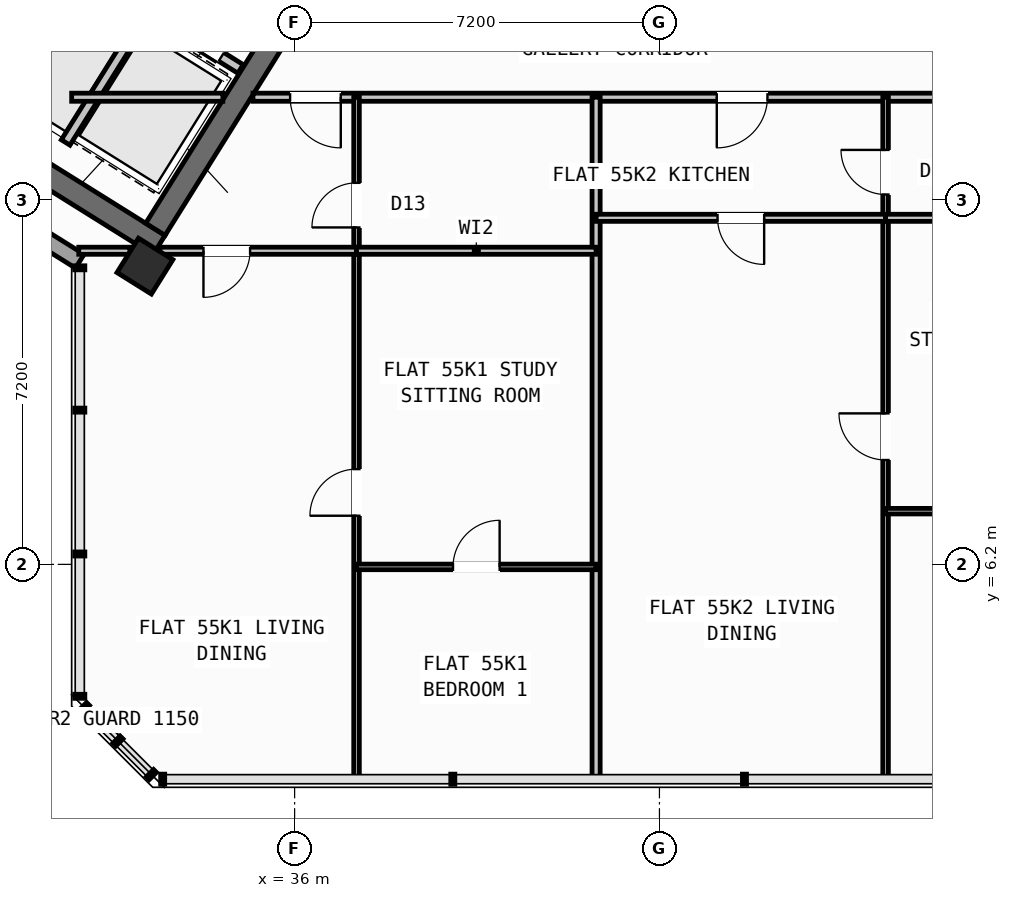
"""IFC4 building model, lengths in metres.
Left out: names, types, materials, properties, quantities, classifications, styles, units other than length and angle.
Written with IfcOpenShell. Run it as: python <this file> out.ifc"""

import sys

from ifc_helpers import new_model, si_unit, direction, frame, frame_2d, origin, origin_2d, place, context, subcontext, project, spatial, rectangle, hollow_rectangle, extrude, source, transform, mapped, element, fill, save


model = new_model("IFC4")
c1 = context("Model", 3, precision=1e-05, world=origin(), true_north=direction((0.0, 1.0)))
c2 = subcontext(c1, "Body", "Model", "MODEL_VIEW")
j1 = project(units=[si_unit("LENGTHUNIT", "METRE"), si_unit("PLANEANGLEUNIT", "RADIAN")], contexts=[c1])
p1 = place(None, origin())
s1 = spatial("IfcSite", under=j1, at=p1, CompositionType="ELEMENT")
p2 = place(p1, origin())
s2 = spatial("IfcBuilding", under=s1, at=p2, CompositionType="ELEMENT")
p3 = place(p2, frame((0.0, 0.0, 218.4)))
s3 = spatial("IfcBuildingStorey", under=s2, at=p3, CompositionType="ELEMENT", Elevation=218.4)
p4 = place(p3, frame((33.324, 12.503, 0.0), z_axis=(0.0, 0.0, 1.0), x_axis=(-0.848043529849, 0.529926571782, 0.0)))
e1 = element("IfcWall", 1, at=p4, inside=s3, PredefinedType="SHEAR", context=c2, shape_type="SweptSolid", body=[
    extrude(rectangle(XDim=13.04, YDim=0.45, at=frame_2d((6.52, 0.0))), origin(), (0.0, 0.0, 1.0), 3.35),
])
p5 = place(p3, frame((36.683, 18.304, 0.0), z_axis=(0.0, 0.0, 1.0), x_axis=(-0.529904039071, -0.848057609704, 0.0)))
e2 = element("IfcWall", 2, at=p5, inside=s3, PredefinedType="SHEAR", context=c2, shape_type="SweptSolid", body=[
    extrude(rectangle(XDim=6.475, YDim=0.45, at=frame_2d((3.238, 0.0))), origin(), (0.0, 0.0, 1.0), 3.35),
])
m1 = source(origin(), c2, "Body", "SweptSolid", [
    extrude(hollow_rectangle(XDim=0.8, YDim=0.8, WallThickness=0.032, at=origin_2d()), origin(), (0.0, 0.0, 1.0), 3.6),
])
p6 = place(p3, frame((33.046, 12.087, 0.0), z_axis=(0.0, 0.0, 1.0), x_axis=(-0.848048096156, 0.529919264233, 0.0)))
e3 = element("IfcColumn", 3, at=p6, inside=s3, PredefinedType="COLUMN", context=c2, shape_type="MappedRepresentation", body=[
    mapped(m1, transform((0.0, 0.0, 0.0), scale=1.0)),
])
p7 = place(p3, frame((31.76, 12.183, 0.0), z_axis=(0.0, 0.0, 1.0), x_axis=(-0.848047074256, 0.529920899612, 0.0)))
e4 = element("IfcWall", 4, at=p7, inside=s3, PredefinedType="STANDARD", context=c2, shape_type="SweptSolid", body=[
    extrude(rectangle(XDim=30.652, YDim=0.32, at=frame_2d((15.326, 0.0))), origin(), (0.0, 0.0, 1.0), 3.35),
])
p8 = place(p7, frame((15.166, 0.0, 0.0)))
e5 = element("IfcOpeningElement", 5, at=p8, cuts=e4, PredefinedType="OPENING", context=c2, shape_type="SweptSolid", body=[
    extrude(rectangle(XDim=1.2, YDim=2.15, at=frame_2d((0.6, 1.075))), frame((0.0, 0.17, 0.0), z_axis=(0.0, -1.0, 0.0), x_axis=(1.0, 0.0, 0.0)), (0.0, 0.0, 1.0), 0.34),
])
p9 = place(p7, frame((2.24, 0.0, 0.9)))
e6 = element("IfcOpeningElement", 6, at=p9, cuts=e4, PredefinedType="OPENING", context=c2, shape_type="SweptSolid", body=[
    extrude(rectangle(XDim=1.65, YDim=1.45, at=frame_2d((0.825, 0.725))), frame((0.0, 0.17, 0.0), z_axis=(0.0, -1.0, 0.0), x_axis=(1.0, 0.0, 0.0)), (0.0, 0.0, 1.0), 0.34),
])
p10 = place(p7, frame((7.469, 0.0, 0.9)))
e7 = element("IfcOpeningElement", 7, at=p10, cuts=e4, PredefinedType="OPENING", context=c2, shape_type="SweptSolid", body=[
    extrude(rectangle(XDim=1.65, YDim=1.45, at=frame_2d((0.825, 0.725))), frame((0.0, 0.17, 0.0), z_axis=(0.0, -1.0, 0.0), x_axis=(1.0, 0.0, 0.0)), (0.0, 0.0, 1.0), 0.34),
])
p11 = place(p7, frame((12.623, 0.0, 1.0)))
e8 = element("IfcOpeningElement", 8, at=p11, cuts=e4, PredefinedType="OPENING", context=c2, shape_type="SweptSolid", body=[
    extrude(rectangle(XDim=0.9, YDim=1.25, at=frame_2d((0.45, 0.625))), frame((0.0, 0.17, 0.0), z_axis=(0.0, -1.0, 0.0), x_axis=(1.0, 0.0, 0.0)), (0.0, 0.0, 1.0), 0.34),
])
p12 = place(p7, frame((19.583, 0.0, 1.0)))
e9 = element("IfcOpeningElement", 9, at=p12, cuts=e4, PredefinedType="OPENING", context=c2, shape_type="SweptSolid", body=[
    extrude(rectangle(XDim=0.9, YDim=1.25, at=frame_2d((0.45, 0.625))), frame((0.0, 0.17, 0.0), z_axis=(0.0, -1.0, 0.0), x_axis=(1.0, 0.0, 0.0)), (0.0, 0.0, 1.0), 0.34),
])
p13 = place(p7, frame((22.033, 0.0, 1.0)))
e10 = element("IfcOpeningElement", 10, at=p13, cuts=e4, PredefinedType="OPENING", context=c2, shape_type="SweptSolid", body=[
    extrude(rectangle(XDim=0.9, YDim=1.25, at=frame_2d((0.45, 0.625))), frame((0.0, 0.17, 0.0), z_axis=(0.0, -1.0, 0.0), x_axis=(1.0, 0.0, 0.0)), (0.0, 0.0, 1.0), 0.34),
])
p14 = place(p7, frame((27.666, 0.0, 0.9)))
e11 = element("IfcOpeningElement", 11, at=p14, cuts=e4, PredefinedType="OPENING", context=c2, shape_type="SweptSolid", body=[
    extrude(rectangle(XDim=1.35, YDim=1.45, at=frame_2d((0.675, 0.725))), frame((0.0, 0.17, 0.0), z_axis=(0.0, -1.0, 0.0), x_axis=(1.0, 0.0, 0.0)), (0.0, 0.0, 1.0), 0.34),
])
p15 = place(p3, frame((31.288, 18.256, 0.0), z_axis=(0.0, 0.0, 1.0), x_axis=(-0.529943379326, -0.848033026897, 0.0)))
e12 = element("IfcWall", 12, at=p15, inside=s3, PredefinedType="SHEAR", context=c2, shape_type="SweptSolid", body=[
    extrude(rectangle(XDim=3.16, YDim=0.26, at=frame_2d((1.58, 0.0))), origin(), (0.0, 0.0, 1.0), 3.35),
])
p16 = place(p3, frame((34.933, 15.978, 0.0), z_axis=(0.0, 0.0, 1.0), x_axis=(-0.848055739377, 0.529907032327, 0.0)))
e13 = element("IfcWall", 13, at=p16, inside=s3, PredefinedType="STANDARD", context=c2, shape_type="SweptSolid", body=[
    extrude(rectangle(XDim=4.298, YDim=0.2, at=frame_2d((2.149, 0.0))), origin(), (0.0, 0.0, 1.0), 3.34),
])
p17 = place(p16, frame((0.448, 0.0, 0.0)))
e14 = element("IfcOpeningElement", 14, at=p17, cuts=e13, PredefinedType="OPENING", context=c2, shape_type="SweptSolid", body=[
    extrude(rectangle(XDim=1.3, YDim=2.2, at=frame_2d((0.65, 1.1))), frame((0.0, 0.11, 0.0), z_axis=(0.0, -1.0, 0.0), x_axis=(1.0, 0.0, 0.0)), (0.0, 0.0, 1.0), 0.22),
])
p18 = place(p16, frame((2.523, 0.0, 0.0)))
e15 = element("IfcOpeningElement", 15, at=p18, cuts=e13, PredefinedType="OPENING", context=c2, shape_type="SweptSolid", body=[
    extrude(rectangle(XDim=1.45, YDim=2.25, at=frame_2d((0.725, 1.125))), frame((0.0, 0.11, 0.0), z_axis=(0.0, -1.0, 0.0), x_axis=(1.0, 0.0, 0.0)), (0.0, 0.0, 1.0), 0.22),
])
p19 = place(p3, frame((33.029, 17.003, 0.0), z_axis=(0.0, 0.0, 1.0), x_axis=(-0.529916267533, -0.848049968695, 0.0)))
e16 = element("IfcWall", 16, at=p19, inside=s3, PredefinedType="STANDARD", context=c2, shape_type="SweptSolid", body=[
    extrude(rectangle(XDim=2.92, YDim=0.2, at=frame_2d((1.46, 0.0))), origin(), (0.0, 0.0, 1.0), 3.34),
])
p20 = place(p3, frame((31.6, 15.42, 0.0), z_axis=(0.0, 0.0, 1.0), x_axis=(1.0, 0.0, 0.0)))
e17 = element("IfcWall", 17, at=p20, inside=s3, PredefinedType="PARTITIONING", context=c2, shape_type="SweptSolid", body=[
    extrude(rectangle(XDim=2.984, YDim=0.16, at=frame_2d((1.492, 0.0))), origin(), (0.0, 0.0, 1.0), 3.34),
])
p21 = place(p3, frame((35.178, 15.42, 0.0), z_axis=(0.0, 0.0, 1.0), x_axis=(1.0, 0.0, 0.0)))
e18 = element("IfcWall", 18, at=p21, inside=s3, PredefinedType="PARTITIONING", context=c2, shape_type="SweptSolid", body=[
    extrude(rectangle(XDim=15.552, YDim=0.16, at=frame_2d((7.776, 0.0))), origin(), (0.0, 0.0, 1.0), 3.34),
])
p22 = place(p21, frame((0.733, 0.0, 0.0)))
e19 = element("IfcOpeningElement", 19, at=p22, cuts=e18, PredefinedType="OPENING", context=c2, shape_type="SweptSolid", body=[
    extrude(rectangle(XDim=1.0, YDim=2.1, at=frame_2d((0.5, 1.05))), frame((0.0, 0.09, 0.0), z_axis=(0.0, -1.0, 0.0), x_axis=(1.0, 0.0, 0.0)), (0.0, 0.0, 1.0), 0.18),
])
p23 = place(p21, frame((9.153, 0.0, 0.0)))
e20 = element("IfcOpeningElement", 20, at=p23, cuts=e18, PredefinedType="OPENING", context=c2, shape_type="SweptSolid", body=[
    extrude(rectangle(XDim=1.0, YDim=2.1, at=frame_2d((0.5, 1.05))), frame((0.0, 0.09, 0.0), z_axis=(0.0, -1.0, 0.0), x_axis=(1.0, 0.0, 0.0)), (0.0, 0.0, 1.0), 0.18),
])
p24 = place(p3, frame((50.119, 16.333, 0.0), z_axis=(0.0, 0.0, 1.0), x_axis=(-0.587749856981, 0.809042709391, 0.0)))
e21 = element("IfcWall", 21, at=p24, inside=s3, PredefinedType="STANDARD", context=c2, shape_type="SweptSolid", body=[
    extrude(rectangle(XDim=2.96, YDim=0.2, at=frame_2d((1.48, 0.0))), origin(), (0.0, 0.0, 1.0), 3.34),
])
p25 = place(p24, frame((0.53, 0.0, 0.0)))
e22 = element("IfcOpeningElement", 22, at=p25, cuts=e21, PredefinedType="OPENING", context=c2, shape_type="SweptSolid", body=[
    extrude(rectangle(XDim=1.5, YDim=2.15, at=frame_2d((0.75, 1.075))), frame((0.0, 0.11, 0.0), z_axis=(0.0, -1.0, 0.0), x_axis=(1.0, 0.0, 0.0)), (0.0, 0.0, 1.0), 0.22),
])
p26 = place(p3, frame((41.95, 1.96, 0.0), z_axis=(0.0, 0.0, 1.0), x_axis=(0.0, 1.0, 0.0)))
e23 = element("IfcWall", 23, at=p26, inside=s3, PredefinedType="PARTITIONING", context=c2, shape_type="SweptSolid", body=[
    extrude(rectangle(XDim=13.46, YDim=0.16, at=frame_2d((6.73, 0.0))), origin(), (0.0, 0.0, 1.0), 3.34),
])
p27 = place(p3, frame((37.222, 1.96, 0.0), z_axis=(0.0, 0.0, 1.0), x_axis=(0.0, 1.0, 0.0)))
e24 = element("IfcWall", 24, at=p27, inside=s3, PredefinedType="PARTITIONING", context=c2, shape_type="SweptSolid", body=[
    extrude(rectangle(XDim=13.46, YDim=0.11, at=frame_2d((6.73, 0.0))), origin(), (0.0, 0.0, 1.0), 3.34),
])
p28 = place(p27, frame((5.2, 0.0, 0.0)))
e25 = element("IfcOpeningElement", 25, at=p28, cuts=e24, PredefinedType="OPENING", context=c2, shape_type="SweptSolid", body=[
    extrude(rectangle(XDim=0.92, YDim=2.08, at=frame_2d((0.46, 1.04))), frame((0.0, 0.065, 0.0), z_axis=(0.0, -1.0, 0.0), x_axis=(1.0, 0.0, 0.0)), (0.0, 0.0, 1.0), 0.13),
])
p29 = place(p27, frame((10.89, 0.0, 0.0)))
e26 = element("IfcOpeningElement", 26, at=p29, cuts=e24, PredefinedType="OPENING", context=c2, shape_type="SweptSolid", body=[
    extrude(rectangle(XDim=0.88, YDim=2.08, at=frame_2d((0.44, 1.04))), frame((0.0, 0.065, 0.0), z_axis=(0.0, -1.0, 0.0), x_axis=(1.0, 0.0, 0.0)), (0.0, 0.0, 1.0), 0.13),
])
p30 = place(p3, frame((31.74, 12.39, 0.0), z_axis=(0.0, 0.0, 1.0), x_axis=(1.0, 0.0, 0.0)))
e27 = element("IfcWall", 27, at=p30, inside=s3, PredefinedType="PLUMBINGWALL", context=c2, shape_type="SweptSolid", body=[
    extrude(rectangle(XDim=1.01, YDim=0.14, at=frame_2d((0.505, 0.0))), origin(), (0.0, 0.0, 1.0), 3.34),
])
p31 = place(p3, frame((33.339, 12.39, 0.0), z_axis=(0.0, 0.0, 1.0), x_axis=(1.0, 0.0, 0.0)))
e28 = element("IfcWall", 28, at=p31, inside=s3, PredefinedType="PLUMBINGWALL", context=c2, shape_type="SweptSolid", body=[
    extrude(rectangle(XDim=3.883, YDim=0.14, at=frame_2d((1.942, 0.0))), origin(), (0.0, 0.0, 1.0), 2.525),
])
p32 = place(p31, frame((0.863, 0.0, 0.0)))
e29 = element("IfcOpeningElement", 29, at=p32, cuts=e28, PredefinedType="OPENING", context=c2, shape_type="SweptSolid", body=[
    extrude(rectangle(XDim=0.92, YDim=2.08, at=frame_2d((0.46, 1.04))), frame((0.0, 0.08, 0.0), z_axis=(0.0, -1.0, 0.0), x_axis=(1.0, 0.0, 0.0)), (0.0, 0.0, 1.0), 0.16),
])
p33 = place(p3, frame((37.222, 12.39, 0.0), z_axis=(0.0, 0.0, 1.0), x_axis=(1.0, 0.0, 0.0)))
e30 = element("IfcWall", 30, at=p33, inside=s3, PredefinedType="PLUMBINGWALL", context=c2, shape_type="SweptSolid", body=[
    extrude(rectangle(XDim=4.728, YDim=0.14, at=frame_2d((2.364, 0.0))), origin(), (0.0, 0.0, 1.0), 2.525),
])
p34 = place(p3, frame((37.222, 6.15, 0.0), z_axis=(0.0, 0.0, 1.0), x_axis=(1.0, 0.0, 0.0)))
e31 = element("IfcWall", 31, at=p34, inside=s3, PredefinedType="PARTITIONING", context=c2, shape_type="SweptSolid", body=[
    extrude(rectangle(XDim=4.728, YDim=0.11, at=frame_2d((2.364, 0.0))), origin(), (0.0, 0.0, 1.0), 3.34),
])
p35 = place(p34, frame((1.904, 0.0, 0.0)))
e32 = element("IfcOpeningElement", 32, at=p35, cuts=e31, PredefinedType="OPENING", context=c2, shape_type="SweptSolid", body=[
    extrude(rectangle(XDim=0.92, YDim=2.08, at=frame_2d((0.46, 1.04))), frame((0.0, 0.065, 0.0), z_axis=(0.0, -1.0, 0.0), x_axis=(1.0, 0.0, 0.0)), (0.0, 0.0, 1.0), 0.13),
])
p36 = place(p3, frame((47.663, 1.96, 0.0), z_axis=(0.0, 0.0, 1.0), x_axis=(0.0, 1.0, 0.0)))
e33 = element("IfcWall", 33, at=p36, inside=s3, PredefinedType="PARTITIONING", context=c2, shape_type="SweptSolid", body=[
    extrude(rectangle(XDim=13.46, YDim=0.11, at=frame_2d((6.73, 0.0))), origin(), (0.0, 0.0, 1.0), 3.34),
])
p37 = place(p36, frame((6.3, 0.0, 0.0)))
e34 = element("IfcOpeningElement", 34, at=p37, cuts=e33, PredefinedType="OPENING", context=c2, shape_type="SweptSolid", body=[
    extrude(rectangle(XDim=0.92, YDim=2.08, at=frame_2d((0.46, 1.04))), frame((0.0, 0.065, 0.0), z_axis=(0.0, -1.0, 0.0), x_axis=(1.0, 0.0, 0.0)), (0.0, 0.0, 1.0), 0.13),
])
p38 = place(p36, frame((11.54, 0.0, 0.0)))
e35 = element("IfcOpeningElement", 35, at=p38, cuts=e33, PredefinedType="OPENING", context=c2, shape_type="SweptSolid", body=[
    extrude(rectangle(XDim=0.88, YDim=2.08, at=frame_2d((0.44, 1.04))), frame((0.0, 0.065, 0.0), z_axis=(0.0, -1.0, 0.0), x_axis=(1.0, 0.0, 0.0)), (0.0, 0.0, 1.0), 0.13),
])
p39 = place(p3, frame((41.95, 13.04, 0.0), z_axis=(0.0, 0.0, 1.0), x_axis=(1.0, 0.0, 0.0)))
e36 = element("IfcWall", 36, at=p39, inside=s3, PredefinedType="PLUMBINGWALL", context=c2, shape_type="SweptSolid", body=[
    extrude(rectangle(XDim=5.713, YDim=0.14, at=frame_2d((2.856, 0.0))), origin(), (0.0, 0.0, 1.0), 3.34),
])
p40 = place(p39, frame((2.396, 0.0, 0.0)))
e37 = element("IfcOpeningElement", 37, at=p40, cuts=e36, PredefinedType="OPENING", context=c2, shape_type="SweptSolid", body=[
    extrude(rectangle(XDim=0.92, YDim=2.08, at=frame_2d((0.46, 1.04))), frame((0.0, 0.08, 0.0), z_axis=(0.0, -1.0, 0.0), x_axis=(1.0, 0.0, 0.0)), (0.0, 0.0, 1.0), 0.16),
])
p41 = place(p3, frame((47.663, 13.04, 0.0), z_axis=(0.0, 0.0, 1.0), x_axis=(1.0, 0.0, 0.0)))
e38 = element("IfcWall", 38, at=p41, inside=s3, PredefinedType="PLUMBINGWALL", context=c2, shape_type="SweptSolid", body=[
    extrude(rectangle(XDim=4.597, YDim=0.14, at=frame_2d((2.298, 0.0))), origin(), (0.0, 0.0, 1.0), 2.525),
])
p42 = place(p3, frame((47.663, 7.25, 0.0), z_axis=(0.0, 0.0, 1.0), x_axis=(1.0, 0.0, 0.0)))
e39 = element("IfcWall", 39, at=p42, inside=s3, PredefinedType="PARTITIONING", context=c2, shape_type="SweptSolid", body=[
    extrude(rectangle(XDim=4.597, YDim=0.11, at=frame_2d((2.298, 0.0))), origin(), (0.0, 0.0, 1.0), 3.34),
])
p43 = place(p42, frame((1.608, 0.0, 0.0)))
e40 = element("IfcOpeningElement", 40, at=p43, cuts=e39, PredefinedType="OPENING", context=c2, shape_type="SweptSolid", body=[
    extrude(rectangle(XDim=0.92, YDim=2.08, at=frame_2d((0.46, 1.04))), frame((0.0, 0.065, 0.0), z_axis=(0.0, -1.0, 0.0), x_axis=(1.0, 0.0, 0.0)), (0.0, 0.0, 1.0), 0.13),
])
m2 = source(origin(), c2, "Body", "SweptSolid", [
    extrude(rectangle(XDim=1.3, YDim=2.2, at=frame_2d((0.65, 1.1))), frame((0.0, 0.025, 0.0), z_axis=(0.0, -1.0, 0.0), x_axis=(1.0, 0.0, 0.0)), (0.0, 0.0, 1.0), 0.05),
])
p44 = place(p17, origin())
e41 = element("IfcDoor", 41, at=p44, inside=s3, OperationType="DOUBLE_DOOR_SLIDING", PredefinedType="DOOR", context=c2, shape_type="MappedRepresentation", body=[
    mapped(m2, transform((0.0, 0.0, 0.0), scale=1.0)),
])
fill(e14, e41)
m3 = source(origin(), c2, "Body", "SweptSolid", [
    extrude(rectangle(XDim=0.92, YDim=2.08, at=frame_2d((0.46, 1.04))), frame((0.0, 0.025, 0.0), z_axis=(0.0, -1.0, 0.0), x_axis=(1.0, 0.0, 0.0)), (0.0, 0.0, 1.0), 0.05),
])
p45 = place(p28, origin())
e42 = element("IfcDoor", 42, at=p45, inside=s3, OperationType="SINGLE_SWING_LEFT", PredefinedType="DOOR", context=c2, shape_type="MappedRepresentation", body=[
    mapped(m3, transform((0.0, 0.0, 0.0), scale=1.0)),
])
fill(e25, e42)
p46 = place(p35, origin())
e43 = element("IfcDoor", 43, at=p46, inside=s3, OperationType="SINGLE_SWING_RIGHT", PredefinedType="DOOR", context=c2, shape_type="MappedRepresentation", body=[
    mapped(m3, transform((0.0, 0.0, 0.0), scale=1.0)),
])
fill(e32, e43)
m4 = source(origin(), c2, "Body", "SweptSolid", [
    extrude(rectangle(XDim=1.0, YDim=2.1, at=frame_2d((0.5, 1.05))), frame((0.0, 0.025, 0.0), z_axis=(0.0, -1.0, 0.0), x_axis=(1.0, 0.0, 0.0)), (0.0, 0.0, 1.0), 0.05),
])
p47 = place(p22, frame((1.0, 0.0, 0.0), z_axis=(0.0, 0.0, 1.0), x_axis=(-1.0, 0.0, 0.0)))
e44 = element("IfcDoor", 44, at=p47, inside=s3, OperationType="SINGLE_SWING_LEFT", PredefinedType="DOOR", context=c2, shape_type="MappedRepresentation", body=[
    mapped(m4, transform((0.0, 0.0, 0.0), scale=1.0)),
])
fill(e19, e44)
p48 = place(p32, frame((0.92, 0.0, 0.0), z_axis=(0.0, 0.0, 1.0), x_axis=(-1.0, 0.0, 0.0)))
e45 = element("IfcDoor", 45, at=p48, inside=s3, OperationType="SINGLE_SWING_RIGHT", PredefinedType="DOOR", context=c2, shape_type="MappedRepresentation", body=[
    mapped(m3, transform((0.0, 0.0, 0.0), scale=1.0)),
])
fill(e29, e45)
m5 = source(origin(), c2, "Body", "SweptSolid", [
    extrude(rectangle(XDim=0.88, YDim=2.08, at=frame_2d((0.44, 1.04))), frame((0.0, 0.025, 0.0), z_axis=(0.0, -1.0, 0.0), x_axis=(1.0, 0.0, 0.0)), (0.0, 0.0, 1.0), 0.05),
])
p49 = place(p29, origin())
e46 = element("IfcDoor", 46, at=p49, inside=s3, OperationType="SINGLE_SWING_LEFT", PredefinedType="DOOR", context=c2, shape_type="MappedRepresentation", body=[
    mapped(m5, transform((0.0, 0.0, 0.0), scale=1.0)),
])
fill(e26, e46)
p50 = place(p37, origin())
e47 = element("IfcDoor", 47, at=p50, inside=s3, OperationType="SINGLE_SWING_RIGHT", PredefinedType="DOOR", context=c2, shape_type="MappedRepresentation", body=[
    mapped(m3, transform((0.0, 0.0, 0.0), scale=1.0)),
])
fill(e34, e47)
p51 = place(p23, frame((1.0, 0.0, 0.0), z_axis=(0.0, 0.0, 1.0), x_axis=(-1.0, 0.0, 0.0)))
e48 = element("IfcDoor", 48, at=p51, inside=s3, OperationType="SINGLE_SWING_RIGHT", PredefinedType="DOOR", context=c2, shape_type="MappedRepresentation", body=[
    mapped(m4, transform((0.0, 0.0, 0.0), scale=1.0)),
])
fill(e20, e48)
p52 = place(p40, frame((0.92, 0.0, 0.0), z_axis=(0.0, 0.0, 1.0), x_axis=(-1.0, 0.0, 0.0)))
e49 = element("IfcDoor", 49, at=p52, inside=s3, OperationType="SINGLE_SWING_LEFT", PredefinedType="DOOR", context=c2, shape_type="MappedRepresentation", body=[
    mapped(m3, transform((0.0, 0.0, 0.0), scale=1.0)),
])
fill(e37, e49)
p53 = place(p38, origin())
e50 = element("IfcDoor", 50, at=p53, inside=s3, OperationType="SINGLE_SWING_RIGHT", PredefinedType="DOOR", context=c2, shape_type="MappedRepresentation", body=[
    mapped(m5, transform((0.0, 0.0, 0.0), scale=1.0)),
])
fill(e35, e50)
save(model, sys.argv[1])
